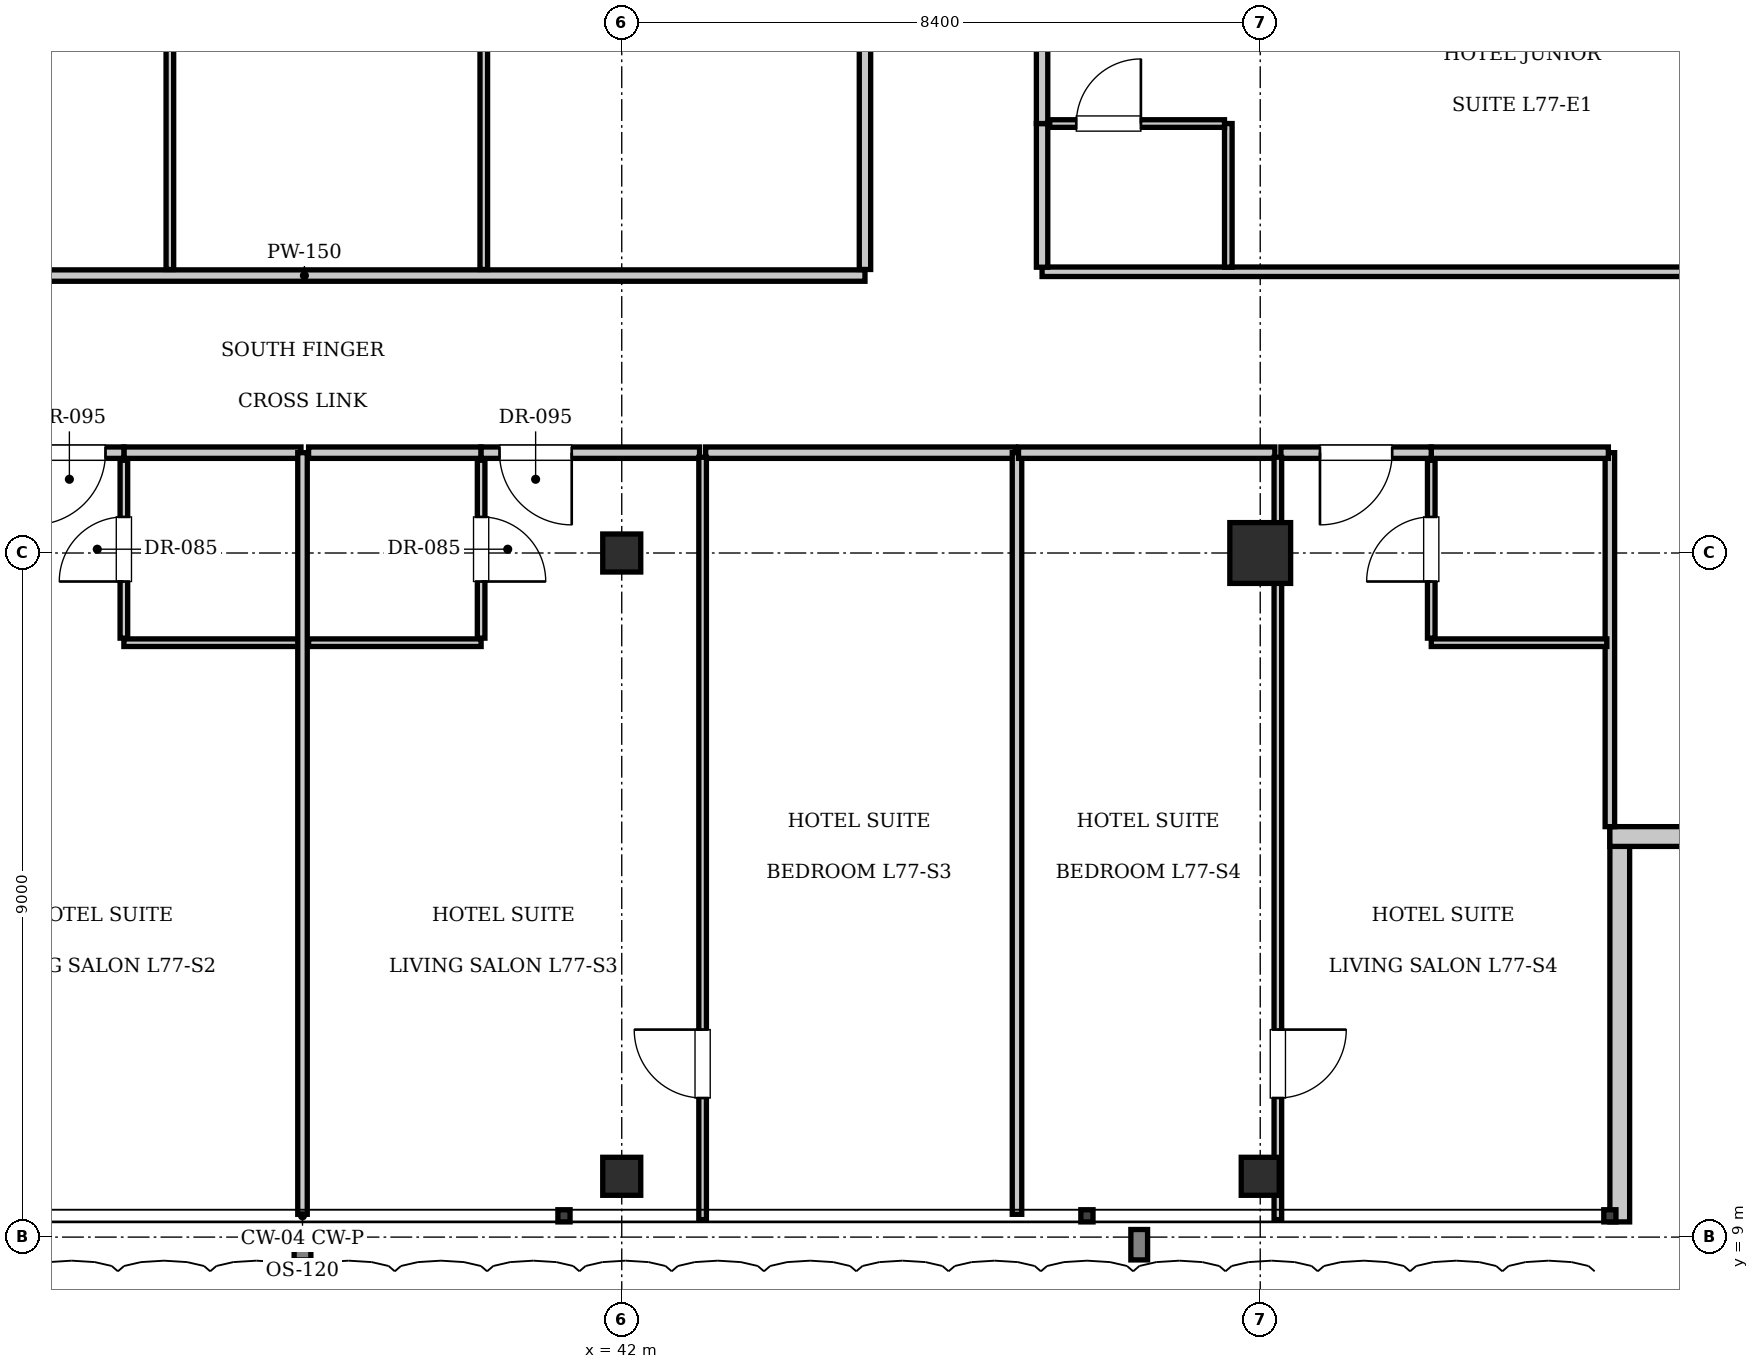
"""IFC4 building model, lengths in metres.
Left out: names, types, materials, properties, quantities, classifications, styles, units other than length and angle.
Written with IfcOpenShell. Run it as: python <this file> out.ifc"""

import sys

from ifc_helpers import new_model, si_unit, direction, frame, frame_2d, origin, origin_2d, place, context, subcontext, project, spatial, rectangle, i_section, extrude, element, fill, save


model = new_model("IFC4")
c1 = context("Model", 3, precision=1e-05, world=origin(), true_north=direction((0.0, 1.0)))
c2 = subcontext(c1, "Body", "Model", "MODEL_VIEW")
j1 = project(units=[si_unit("LENGTHUNIT", "METRE"), si_unit("PLANEANGLEUNIT", "RADIAN")], contexts=[c1])
p1 = place(None, origin())
s1 = spatial("IfcSite", under=j1, at=p1, CompositionType="ELEMENT")
p2 = place(p1, origin())
s2 = spatial("IfcBuilding", under=s1, at=p2, CompositionType="ELEMENT")
p3 = place(p2, frame((0.0, 0.0, 312.55)))
s3 = spatial("IfcBuildingStorey", under=s2, at=p3, CompositionType="ELEMENT", Elevation=312.55)
p4 = place(p3, frame((50.4, 18.0, 0.0), z_axis=(0.0, 0.0, 1.0), x_axis=(1.0, 0.0, 0.0)))
e1 = element("IfcColumn", 1, at=p4, inside=s3, PredefinedType="COLUMN", context=c2, shape_type="SweptSolid", body=[
    extrude(rectangle(XDim=0.8, YDim=0.8, at=origin_2d()), origin(), (0.0, 0.0, 1.0), 3.85),
])
for number, where, z_axis, x_axis in (
    (2, (42.0, 18.0, 0.0), (0.0, 0.0, 1.0), (1.0, 0.0, 0.0)),
    (3, (42.0, 9.8, 0.0), (0.0, 0.0, 1.0), (1.0, 0.0, 0.0)),
    (4, (50.4, 9.8, 0.0), (0.0, 0.0, 1.0), (1.0, 0.0, 0.0)),
):
    element("IfcColumn", number, at=place(p3, frame(where, z_axis=z_axis, x_axis=x_axis)), inside=s3, PredefinedType="COLUMN", context=c2, shape_type="SweptSolid", body=[
        extrude(i_section(OverallWidth=0.5, OverallDepth=0.5, WebThickness=0.022, FlangeThickness=0.032, at=origin_2d()), origin(), (0.0, 0.0, 1.0), 3.85),
    ])
p5 = place(p3, frame((55.13, 14.4, 0.0), z_axis=(0.0, 0.0, 1.0), x_axis=(0.0, -1.0, 0.0)))
e5 = element("IfcWall", 5, at=p5, inside=s3, PredefinedType="SOLIDWALL", context=c2, shape_type="SweptSolid", body=[
    extrude(rectangle(XDim=5.2, YDim=0.26, at=frame_2d((2.6, 0.0))), origin(), (0.0, 0.0, 1.0), 3.55),
])
p6 = place(p3, frame((60.2, 14.27, 0.0), z_axis=(0.0, 0.0, 1.0), x_axis=(-1.0, 0.0, 0.0)))
e6 = element("IfcWall", 6, at=p6, inside=s3, PredefinedType="SOLIDWALL", context=c2, shape_type="SweptSolid", body=[
    extrude(rectangle(XDim=5.2, YDim=0.26, at=frame_2d((2.6, 0.0))), origin(), (0.0, 0.0, 1.0), 3.55),
])
p7 = place(p6, frame((1.6, 0.0, 0.9)))
e7 = element("IfcOpeningElement", 7, at=p7, cuts=e6, PredefinedType="OPENING", context=c2, shape_type="SweptSolid", body=[
    extrude(rectangle(XDim=2.0, YDim=2.2, at=frame_2d((1.0, 1.1))), frame((0.0, 0.14, 0.0), z_axis=(0.0, -1.0, 0.0), x_axis=(1.0, 0.0, 0.0)), (0.0, 0.0, 1.0), 0.28),
])
p8 = place(p3, frame((30.45, 21.65, 0.0), z_axis=(0.0, 0.0, 1.0), x_axis=(1.0, 0.0, 0.0)))
e8 = element("IfcWall", 8, at=p8, inside=s3, PredefinedType="PARTITIONING", context=c2, shape_type="SweptSolid", body=[
    extrude(rectangle(XDim=14.75, YDim=0.15, at=frame_2d((7.375, 0.0))), origin(), (0.0, 0.0, 1.0), 3.55),
])
p9 = place(p3, frame((45.2, 21.73, 0.0), z_axis=(0.0, 0.0, 1.0), x_axis=(0.0, 1.0, 0.0)))
e9 = element("IfcWall", 9, at=p9, inside=s3, PredefinedType="PARTITIONING", context=c2, shape_type="SweptSolid", body=[
    extrude(rectangle(XDim=8.49, YDim=0.15, at=frame_2d((4.245, 0.0))), origin(), (0.0, 0.0, 1.0), 3.55),
])
for number, where, z_axis, x_axis in (
    (10, (36.055, 21.73, 0.0), (0.0, 0.0, 1.0), (0.0, 1.0, 0.0)),
    (11, (40.185, 21.73, 0.0), (0.0, 0.0, 1.0), (0.0, 1.0, 0.0)),
):
    element("IfcWall", number, at=place(p3, frame(where, z_axis=z_axis, x_axis=x_axis)), inside=s3, PredefinedType="PARTITIONING", context=c2, shape_type="SweptSolid", body=[
        extrude(rectangle(XDim=8.49, YDim=0.1, at=frame_2d((4.245, 0.0))), origin(), (0.0, 0.0, 1.0), 3.55),
    ])
p10 = place(p3, frame((55.0, 14.4, 0.0), z_axis=(0.0, 0.0, 1.0), x_axis=(0.0, 1.0, 0.0)))
e12 = element("IfcWall", 12, at=p10, inside=s3, PredefinedType="PARTITIONING", context=c2, shape_type="SweptSolid", body=[
    extrude(rectangle(XDim=4.92, YDim=0.125, at=frame_2d((2.46, 0.0))), origin(), (0.0, 0.0, 1.0), 3.55),
])
p11 = place(p3, frame((35.45, 19.32, 0.0), z_axis=(0.0, 0.0, 1.0), x_axis=(1.0, 0.0, 0.0)))
e13 = element("IfcWall", 13, at=p11, inside=s3, PredefinedType="PARTITIONING", context=c2, shape_type="SweptSolid", body=[
    extrude(rectangle(XDim=2.33, YDim=0.15, at=frame_2d((1.165, 0.0))), origin(), (0.0, 0.0, 1.0), 3.55),
])
p12 = place(p3, frame((35.45, 16.82, 0.0), z_axis=(0.0, 0.0, 1.0), x_axis=(1.0, 0.0, 0.0)))
e14 = element("IfcWall", 14, at=p12, inside=s3, PredefinedType="PARTITIONING", context=c2, shape_type="SweptSolid", body=[
    extrude(rectangle(XDim=2.31, YDim=0.1, at=frame_2d((1.155, 0.0))), origin(), (0.0, 0.0, 1.0), 3.55),
])
p13 = place(p3, frame((35.45, 16.88, 0.0), z_axis=(0.0, 0.0, 1.0), x_axis=(0.0, 1.0, 0.0)))
e15 = element("IfcWall", 15, at=p13, inside=s3, PredefinedType="PARTITIONING", context=c2, shape_type="SweptSolid", body=[
    extrude(rectangle(XDim=2.34, YDim=0.1, at=frame_2d((1.17, 0.0))), origin(), (0.0, 0.0, 1.0), 3.55),
])
p14 = place(p13, frame((0.745, 0.0, 0.0)))
e16 = element("IfcOpeningElement", 16, at=p14, cuts=e15, PredefinedType="OPENING", context=c2, shape_type="SweptSolid", body=[
    extrude(rectangle(XDim=0.85, YDim=2.1, at=frame_2d((0.425, 1.05))), frame((0.0, 0.06, 0.0), z_axis=(0.0, -1.0, 0.0), x_axis=(1.0, 0.0, 0.0)), (0.0, 0.0, 1.0), 0.12),
])
p15 = place(p3, frame((32.576, 19.32, 0.0), z_axis=(0.0, 0.0, 1.0), x_axis=(1.0, 0.0, 0.0)))
e17 = element("IfcWall", 17, at=p15, inside=s3, PredefinedType="PARTITIONING", context=c2, shape_type="SweptSolid", body=[
    extrude(rectangle(XDim=2.874, YDim=0.15, at=frame_2d((1.437, 0.0))), origin(), (0.0, 0.0, 1.0), 3.55),
])
p16 = place(p15, frame((1.682, 0.0, 0.0)))
e18 = element("IfcOpeningElement", 18, at=p16, cuts=e17, PredefinedType="OPENING", context=c2, shape_type="SweptSolid", body=[
    extrude(rectangle(XDim=0.95, YDim=2.15, at=frame_2d((0.475, 1.075))), frame((0.0, 0.085, 0.0), z_axis=(0.0, -1.0, 0.0), x_axis=(1.0, 0.0, 0.0)), (0.0, 0.0, 1.0), 0.17),
])
p17 = place(p3, frame((37.8, 9.3, 0.0), z_axis=(0.0, 0.0, 1.0), x_axis=(0.0, 1.0, 0.0)))
e19 = element("IfcWall", 19, at=p17, inside=s3, PredefinedType="PARTITIONING", context=c2, shape_type="SweptSolid", body=[
    extrude(rectangle(XDim=10.02, YDim=0.125, at=frame_2d((5.01, 0.0))), origin(), (0.0, 0.0, 1.0), 3.244),
])
p18 = place(p3, frame((37.88, 19.32, 0.0), z_axis=(0.0, 0.0, 1.0), x_axis=(1.0, 0.0, 0.0)))
e20 = element("IfcWall", 20, at=p18, inside=s3, PredefinedType="PARTITIONING", context=c2, shape_type="SweptSolid", body=[
    extrude(rectangle(XDim=2.27, YDim=0.15, at=frame_2d((1.135, 0.0))), origin(), (0.0, 0.0, 1.0), 3.55),
])
p19 = place(p3, frame((37.88, 16.82, 0.0), z_axis=(0.0, 0.0, 1.0), x_axis=(1.0, 0.0, 0.0)))
e21 = element("IfcWall", 21, at=p19, inside=s3, PredefinedType="PARTITIONING", context=c2, shape_type="SweptSolid", body=[
    extrude(rectangle(XDim=2.27, YDim=0.1, at=frame_2d((1.135, 0.0))), origin(), (0.0, 0.0, 1.0), 3.55),
])
p20 = place(p3, frame((40.15, 16.88, 0.0), z_axis=(0.0, 0.0, 1.0), x_axis=(0.0, 1.0, 0.0)))
e22 = element("IfcWall", 22, at=p20, inside=s3, PredefinedType="PARTITIONING", context=c2, shape_type="SweptSolid", body=[
    extrude(rectangle(XDim=2.34, YDim=0.1, at=frame_2d((1.17, 0.0))), origin(), (0.0, 0.0, 1.0), 3.55),
])
p21 = place(p20, frame((0.745, 0.0, 0.0)))
e23 = element("IfcOpeningElement", 23, at=p21, cuts=e22, PredefinedType="OPENING", context=c2, shape_type="SweptSolid", body=[
    extrude(rectangle(XDim=0.85, YDim=2.1, at=frame_2d((0.425, 1.05))), frame((0.0, 0.06, 0.0), z_axis=(0.0, -1.0, 0.0), x_axis=(1.0, 0.0, 0.0)), (0.0, 0.0, 1.0), 0.12),
])
p22 = place(p3, frame((40.15, 19.32, 0.0), z_axis=(0.0, 0.0, 1.0), x_axis=(1.0, 0.0, 0.0)))
e24 = element("IfcWall", 24, at=p22, inside=s3, PredefinedType="PARTITIONING", context=c2, shape_type="SweptSolid", body=[
    extrude(rectangle(XDim=2.874, YDim=0.15, at=frame_2d((1.437, 0.0))), origin(), (0.0, 0.0, 1.0), 3.55),
])
p23 = place(p22, frame((0.242, 0.0, 0.0)))
e25 = element("IfcOpeningElement", 25, at=p23, cuts=e24, PredefinedType="OPENING", context=c2, shape_type="SweptSolid", body=[
    extrude(rectangle(XDim=0.95, YDim=2.15, at=frame_2d((0.475, 1.075))), frame((0.0, 0.085, 0.0), z_axis=(0.0, -1.0, 0.0), x_axis=(1.0, 0.0, 0.0)), (0.0, 0.0, 1.0), 0.17),
])
p24 = place(p3, frame((43.104, 19.32, 0.0), z_axis=(0.0, 0.0, 1.0), x_axis=(1.0, 0.0, 0.0)))
e26 = element("IfcWall", 26, at=p24, inside=s3, PredefinedType="PARTITIONING", context=c2, shape_type="SweptSolid", body=[
    extrude(rectangle(XDim=4.076, YDim=0.15, at=frame_2d((2.038, 0.0))), origin(), (0.0, 0.0, 1.0), 3.55),
])
p25 = place(p3, frame((43.064, 9.23, 0.0), z_axis=(0.0, 0.0, 1.0), x_axis=(0.0, 1.0, 0.0)))
e27 = element("IfcWall", 27, at=p25, inside=s3, PredefinedType="PARTITIONING", context=c2, shape_type="SweptSolid", body=[
    extrude(rectangle(XDim=10.03, YDim=0.1, at=frame_2d((5.015, 0.0))), origin(), (0.0, 0.0, 1.0), 3.55),
])
p26 = place(p25, frame((1.6, 0.0, 0.0)))
e28 = element("IfcOpeningElement", 28, at=p26, cuts=e27, PredefinedType="OPENING", context=c2, shape_type="SweptSolid", body=[
    extrude(rectangle(XDim=0.9, YDim=2.1, at=frame_2d((0.45, 1.05))), frame((0.0, 0.06, 0.0), z_axis=(0.0, -1.0, 0.0), x_axis=(1.0, 0.0, 0.0)), (0.0, 0.0, 1.0), 0.12),
])
p27 = place(p3, frame((47.2, 9.3, 0.0), z_axis=(0.0, 0.0, 1.0), x_axis=(0.0, 1.0, 0.0)))
e29 = element("IfcWall", 29, at=p27, inside=s3, PredefinedType="PARTITIONING", context=c2, shape_type="SweptSolid", body=[
    extrude(rectangle(XDim=10.02, YDim=0.125, at=frame_2d((5.01, 0.0))), origin(), (0.0, 0.0, 1.0), 3.55),
])
p28 = place(p3, frame((52.65, 19.32, 0.0), z_axis=(0.0, 0.0, 1.0), x_axis=(1.0, 0.0, 0.0)))
e30 = element("IfcWall", 30, at=p28, inside=s3, PredefinedType="PARTITIONING", context=c2, shape_type="SweptSolid", body=[
    extrude(rectangle(XDim=2.33, YDim=0.15, at=frame_2d((1.165, 0.0))), origin(), (0.0, 0.0, 1.0), 3.55),
])
p29 = place(p3, frame((52.65, 16.82, 0.0), z_axis=(0.0, 0.0, 1.0), x_axis=(1.0, 0.0, 0.0)))
e31 = element("IfcWall", 31, at=p29, inside=s3, PredefinedType="PARTITIONING", context=c2, shape_type="SweptSolid", body=[
    extrude(rectangle(XDim=2.31, YDim=0.1, at=frame_2d((1.155, 0.0))), origin(), (0.0, 0.0, 1.0), 3.55),
])
p30 = place(p3, frame((52.65, 16.88, 0.0), z_axis=(0.0, 0.0, 1.0), x_axis=(0.0, 1.0, 0.0)))
e32 = element("IfcWall", 32, at=p30, inside=s3, PredefinedType="PARTITIONING", context=c2, shape_type="SweptSolid", body=[
    extrude(rectangle(XDim=2.34, YDim=0.1, at=frame_2d((1.17, 0.0))), origin(), (0.0, 0.0, 1.0), 3.55),
])
p31 = place(p30, frame((0.745, 0.0, 0.0)))
e33 = element("IfcOpeningElement", 33, at=p31, cuts=e32, PredefinedType="OPENING", context=c2, shape_type="SweptSolid", body=[
    extrude(rectangle(XDim=0.85, YDim=2.1, at=frame_2d((0.425, 1.05))), frame((0.0, 0.06, 0.0), z_axis=(0.0, -1.0, 0.0), x_axis=(1.0, 0.0, 0.0)), (0.0, 0.0, 1.0), 0.12),
])
p32 = place(p3, frame((47.22, 19.32, 0.0), z_axis=(0.0, 0.0, 1.0), x_axis=(1.0, 0.0, 0.0)))
e34 = element("IfcWall", 34, at=p32, inside=s3, PredefinedType="PARTITIONING", context=c2, shape_type="SweptSolid", body=[
    extrude(rectangle(XDim=3.372, YDim=0.15, at=frame_2d((1.686, 0.0))), origin(), (0.0, 0.0, 1.0), 3.55),
])
p33 = place(p3, frame((50.672, 19.32, 0.0), z_axis=(0.0, 0.0, 1.0), x_axis=(1.0, 0.0, 0.0)))
e35 = element("IfcWall", 35, at=p33, inside=s3, PredefinedType="PARTITIONING", context=c2, shape_type="SweptSolid", body=[
    extrude(rectangle(XDim=1.978, YDim=0.15, at=frame_2d((0.989, 0.0))), origin(), (0.0, 0.0, 1.0), 3.55),
])
p34 = place(p33, frame((0.514, 0.0, 0.0)))
e36 = element("IfcOpeningElement", 36, at=p34, cuts=e35, PredefinedType="OPENING", context=c2, shape_type="SweptSolid", body=[
    extrude(rectangle(XDim=0.95, YDim=2.15, at=frame_2d((0.475, 1.075))), frame((0.0, 0.085, 0.0), z_axis=(0.0, -1.0, 0.0), x_axis=(1.0, 0.0, 0.0)), (0.0, 0.0, 1.0), 0.17),
])
p35 = place(p3, frame((50.632, 9.23, 0.0), z_axis=(0.0, 0.0, 1.0), x_axis=(0.0, 1.0, 0.0)))
e37 = element("IfcWall", 37, at=p35, inside=s3, PredefinedType="PARTITIONING", context=c2, shape_type="SweptSolid", body=[
    extrude(rectangle(XDim=10.03, YDim=0.1, at=frame_2d((5.015, 0.0))), origin(), (0.0, 0.0, 1.0), 3.55),
])
p36 = place(p35, frame((1.6, 0.0, 0.0)))
e38 = element("IfcOpeningElement", 38, at=p36, cuts=e37, PredefinedType="OPENING", context=c2, shape_type="SweptSolid", body=[
    extrude(rectangle(XDim=0.9, YDim=2.1, at=frame_2d((0.45, 1.05))), frame((0.0, 0.06, 0.0), z_axis=(0.0, -1.0, 0.0), x_axis=(1.0, 0.0, 0.0)), (0.0, 0.0, 1.0), 0.12),
])
p37 = place(p3, frame((47.53, 21.7, 0.0), z_axis=(0.0, 0.0, 1.0), x_axis=(1.0, 0.0, 0.0)))
e39 = element("IfcWall", 39, at=p37, inside=s3, PredefinedType="PARTITIONING", context=c2, shape_type="SweptSolid", body=[
    extrude(rectangle(XDim=12.57, YDim=0.125, at=frame_2d((6.285, 0.0))), origin(), (0.0, 0.0, 1.0), 3.55),
])
p38 = place(p3, frame((47.53, 21.76, 0.0), z_axis=(0.0, 0.0, 1.0), x_axis=(0.0, 1.0, 0.0)))
e40 = element("IfcWall", 40, at=p38, inside=s3, PredefinedType="PARTITIONING", context=c2, shape_type="SweptSolid", body=[
    extrude(rectangle(XDim=1.89, YDim=0.15, at=frame_2d((0.945, 0.0))), origin(), (0.0, 0.0, 1.0), 3.55),
])
p39 = place(p3, frame((47.53, 23.65, 0.0), z_axis=(0.0, 0.0, 1.0), x_axis=(0.0, 1.0, 0.0)))
e41 = element("IfcWall", 41, at=p39, inside=s3, PredefinedType="PARTITIONING", context=c2, shape_type="SweptSolid", body=[
    extrude(rectangle(XDim=3.33, YDim=0.15, at=frame_2d((1.665, 0.0))), origin(), (0.0, 0.0, 1.0), 3.55),
])
p40 = place(p39, frame((1.19, 0.0, 0.0)))
e42 = element("IfcOpeningElement", 42, at=p40, cuts=e41, PredefinedType="OPENING", context=c2, shape_type="SweptSolid", body=[
    extrude(rectangle(XDim=0.95, YDim=2.15, at=frame_2d((0.475, 1.075))), frame((0.0, 0.085, 0.0), z_axis=(0.0, -1.0, 0.0), x_axis=(1.0, 0.0, 0.0)), (0.0, 0.0, 1.0), 0.17),
])
p41 = place(p3, frame((49.98, 21.76, 0.0), z_axis=(0.0, 0.0, 1.0), x_axis=(0.0, 1.0, 0.0)))
e43 = element("IfcWall", 43, at=p41, inside=s3, PredefinedType="PARTITIONING", context=c2, shape_type="SweptSolid", body=[
    extrude(rectangle(XDim=1.89, YDim=0.1, at=frame_2d((0.945, 0.0))), origin(), (0.0, 0.0, 1.0), 3.55),
])
p42 = place(p3, frame((47.63, 23.65, 0.0), z_axis=(0.0, 0.0, 1.0), x_axis=(1.0, 0.0, 0.0)))
e44 = element("IfcWall", 44, at=p42, inside=s3, PredefinedType="PARTITIONING", context=c2, shape_type="SweptSolid", body=[
    extrude(rectangle(XDim=2.3, YDim=0.1, at=frame_2d((1.15, 0.0))), origin(), (0.0, 0.0, 1.0), 3.55),
])
p43 = place(p42, frame((0.35, 0.0, 0.0)))
e45 = element("IfcOpeningElement", 45, at=p43, cuts=e44, PredefinedType="OPENING", context=c2, shape_type="SweptSolid", body=[
    extrude(rectangle(XDim=0.85, YDim=2.1, at=frame_2d((0.425, 1.05))), frame((0.0, 0.06, 0.0), z_axis=(0.0, -1.0, 0.0), x_axis=(1.0, 0.0, 0.0)), (0.0, 0.0, 1.0), 0.12),
])
p44 = place(p14, origin())
e46 = element("IfcDoor", 46, at=p44, inside=s3, OperationType="SINGLE_SWING_LEFT", PredefinedType="DOOR", context=c2, shape_type="SweptSolid", body=[
    extrude(rectangle(XDim=0.85, YDim=2.1, at=frame_2d((0.425, 1.05))), frame((0.0, 0.025, 0.0), z_axis=(0.0, -1.0, 0.0), x_axis=(1.0, 0.0, 0.0)), (0.0, 0.0, 1.0), 0.05),
])
fill(e16, e46)
p45 = place(p16, frame((0.95, 0.0, 0.0), z_axis=(0.0, 0.0, 1.0), x_axis=(-1.0, 0.0, 0.0)))
e47 = element("IfcDoor", 47, at=p45, inside=s3, OperationType="SINGLE_SWING_RIGHT", PredefinedType="DOOR", context=c2, shape_type="SweptSolid", body=[
    extrude(rectangle(XDim=0.95, YDim=2.15, at=frame_2d((0.475, 1.075))), frame((0.0, 0.025, 0.0), z_axis=(0.0, -1.0, 0.0), x_axis=(1.0, 0.0, 0.0)), (0.0, 0.0, 1.0), 0.05),
])
fill(e18, e47)
p46 = place(p21, frame((0.85, 0.0, 0.0), z_axis=(0.0, 0.0, 1.0), x_axis=(-1.0, 0.0, 0.0)))
e48 = element("IfcDoor", 48, at=p46, inside=s3, OperationType="SINGLE_SWING_RIGHT", PredefinedType="DOOR", context=c2, shape_type="SweptSolid", body=[
    extrude(rectangle(XDim=0.85, YDim=2.1, at=frame_2d((0.425, 1.05))), frame((0.0, 0.025, 0.0), z_axis=(0.0, -1.0, 0.0), x_axis=(1.0, 0.0, 0.0)), (0.0, 0.0, 1.0), 0.05),
])
fill(e23, e48)
p47 = place(p23, frame((0.95, 0.0, 0.0), z_axis=(0.0, 0.0, 1.0), x_axis=(-1.0, 0.0, 0.0)))
e49 = element("IfcDoor", 49, at=p47, inside=s3, OperationType="SINGLE_SWING_LEFT", PredefinedType="DOOR", context=c2, shape_type="SweptSolid", body=[
    extrude(rectangle(XDim=0.95, YDim=2.15, at=frame_2d((0.475, 1.075))), frame((0.0, 0.025, 0.0), z_axis=(0.0, -1.0, 0.0), x_axis=(1.0, 0.0, 0.0)), (0.0, 0.0, 1.0), 0.05),
])
fill(e25, e49)
p48 = place(p26, origin())
e50 = element("IfcDoor", 50, at=p48, inside=s3, OperationType="SINGLE_SWING_RIGHT", PredefinedType="DOOR", context=c2, shape_type="SweptSolid", body=[
    extrude(rectangle(XDim=0.9, YDim=2.1, at=frame_2d((0.45, 1.05))), frame((0.0, 0.025, 0.0), z_axis=(0.0, -1.0, 0.0), x_axis=(1.0, 0.0, 0.0)), (0.0, 0.0, 1.0), 0.05),
])
fill(e28, e50)
p49 = place(p31, origin())
e51 = element("IfcDoor", 51, at=p49, inside=s3, OperationType="SINGLE_SWING_LEFT", PredefinedType="DOOR", context=c2, shape_type="SweptSolid", body=[
    extrude(rectangle(XDim=0.85, YDim=2.1, at=frame_2d((0.425, 1.05))), frame((0.0, 0.025, 0.0), z_axis=(0.0, -1.0, 0.0), x_axis=(1.0, 0.0, 0.0)), (0.0, 0.0, 1.0), 0.05),
])
fill(e33, e51)
p50 = place(p34, frame((0.95, 0.0, 0.0), z_axis=(0.0, 0.0, 1.0), x_axis=(-1.0, 0.0, 0.0)))
e52 = element("IfcDoor", 52, at=p50, inside=s3, OperationType="SINGLE_SWING_RIGHT", PredefinedType="DOOR", context=c2, shape_type="SweptSolid", body=[
    extrude(rectangle(XDim=0.95, YDim=2.15, at=frame_2d((0.475, 1.075))), frame((0.0, 0.025, 0.0), z_axis=(0.0, -1.0, 0.0), x_axis=(1.0, 0.0, 0.0)), (0.0, 0.0, 1.0), 0.05),
])
fill(e36, e52)
p51 = place(p36, frame((0.9, 0.0, 0.0), z_axis=(0.0, 0.0, 1.0), x_axis=(-1.0, 0.0, 0.0)))
e53 = element("IfcDoor", 53, at=p51, inside=s3, OperationType="SINGLE_SWING_LEFT", PredefinedType="DOOR", context=c2, shape_type="SweptSolid", body=[
    extrude(rectangle(XDim=0.9, YDim=2.1, at=frame_2d((0.45, 1.05))), frame((0.0, 0.025, 0.0), z_axis=(0.0, -1.0, 0.0), x_axis=(1.0, 0.0, 0.0)), (0.0, 0.0, 1.0), 0.05),
])
fill(e38, e53)
p52 = place(p43, origin())
e54 = element("IfcDoor", 54, at=p52, inside=s3, OperationType="SINGLE_SWING_RIGHT", PredefinedType="DOOR", context=c2, shape_type="SweptSolid", body=[
    extrude(rectangle(XDim=0.85, YDim=2.1, at=frame_2d((0.425, 1.05))), frame((0.0, 0.025, 0.0), z_axis=(0.0, -1.0, 0.0), x_axis=(1.0, 0.0, 0.0)), (0.0, 0.0, 1.0), 0.05),
])
fill(e45, e54)
save(model, sys.argv[1])
